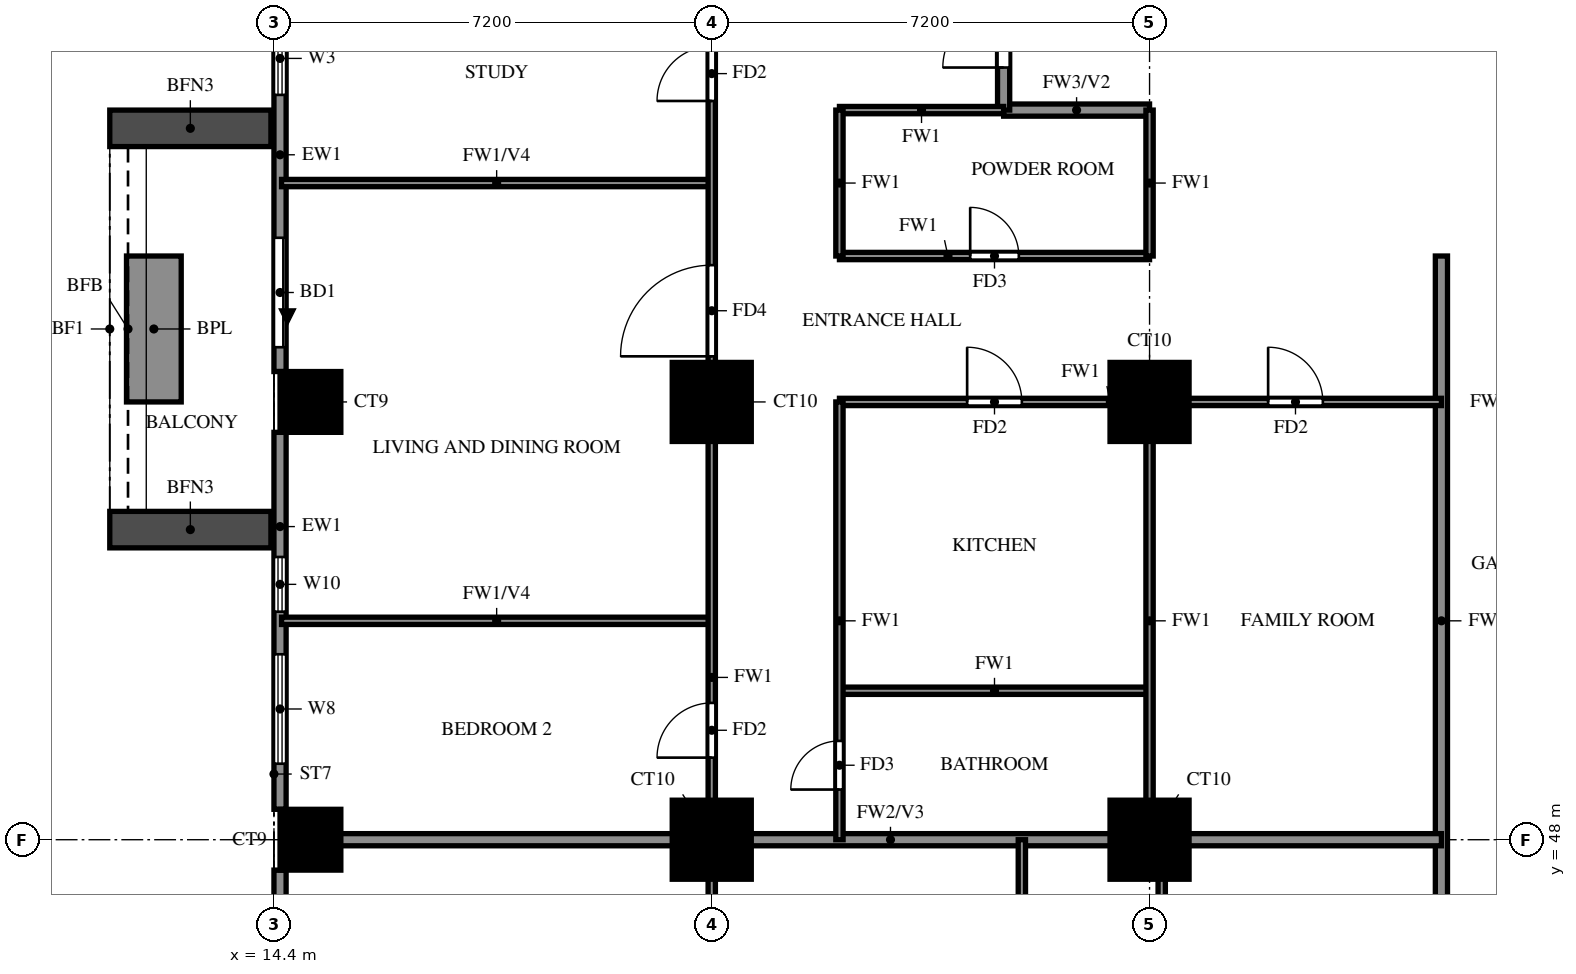
"""IFC4 building model, lengths in metres.
Left out: names, types, materials, properties, quantities, classifications, styles, units other than length and angle.
Written with IfcOpenShell. Run it as: python <this file> out.ifc"""

import sys

from ifc_helpers import new_model, si_unit, direction, frame, frame_2d, origin, origin_2d, place, context, subcontext, project, spatial, rectangle, extrude, source, transform, mapped, element, fill, save


model = new_model("IFC4")
c1 = context("Model", 3, precision=1e-05, world=origin(), true_north=direction((0.0, 1.0)))
c2 = subcontext(c1, "Body", "Model", "MODEL_VIEW")
j1 = project(units=[si_unit("LENGTHUNIT", "METRE"), si_unit("PLANEANGLEUNIT", "RADIAN")], contexts=[c1])
p1 = place(None, origin())
s1 = spatial("IfcSite", under=j1, at=p1, CompositionType="ELEMENT")
p2 = place(p1, origin())
s2 = spatial("IfcBuilding", under=s1, at=p2, CompositionType="ELEMENT")
p3 = place(p2, frame((0.0, 0.0, 86.5)))
s3 = spatial("IfcBuildingStorey", under=s2, at=p3, CompositionType="ELEMENT", Elevation=86.5)
m1 = source(origin(), c2, "Body", "SweptSolid", [
    extrude(rectangle(XDim=1.0, YDim=1.0, at=origin_2d()), origin(), (0.0, 0.0, 1.0), 3.18),
])
p4 = place(p3, frame((15.0, 48.0, 0.0), z_axis=(0.0, 0.0, 1.0), x_axis=(1.0, 0.0, 0.0)))
e1 = element("IfcColumn", 1, at=p4, inside=s3, PredefinedType="COLUMN", context=c2, shape_type="MappedRepresentation", body=[
    mapped(m1, transform((0.0, 0.0, 0.0))),
])
m2 = source(origin(), c2, "Body", "SweptSolid", [
    extrude(rectangle(XDim=1.3, YDim=1.3, at=origin_2d()), origin(), (0.0, 0.0, 1.0), 3.18),
])
for number, where, z_axis, x_axis in (
    (2, (21.6, 48.0, 0.0), (0.0, 0.0, 1.0), (1.0, 0.0, 0.0)),
    (3, (28.8, 48.0, 0.0), (0.0, 0.0, 1.0), (1.0, 0.0, 0.0)),
):
    element("IfcColumn", number, at=place(p3, frame(where, z_axis=z_axis, x_axis=x_axis)), inside=s3, PredefinedType="COLUMN", context=c2, shape_type="MappedRepresentation", body=[
        mapped(m2, transform((0.0, 0.0, 0.0))),
    ])
p5 = place(p3, frame((15.0, 55.2, 0.0), z_axis=(0.0, 0.0, 1.0), x_axis=(1.0, 0.0, 0.0)))
e4 = element("IfcColumn", 4, at=p5, inside=s3, PredefinedType="COLUMN", context=c2, shape_type="MappedRepresentation", body=[
    mapped(m1, transform((0.0, 0.0, 0.0))),
])
for number, where, z_axis, x_axis in (
    (5, (21.6, 55.2, 0.0), (0.0, 0.0, 1.0), (1.0, 0.0, 0.0)),
    (6, (28.8, 55.2, 0.0), (0.0, 0.0, 1.0), (1.0, 0.0, 0.0)),
):
    element("IfcColumn", number, at=place(p3, frame(where, z_axis=z_axis, x_axis=x_axis)), inside=s3, PredefinedType="COLUMN", context=c2, shape_type="MappedRepresentation", body=[
        mapped(m2, transform((0.0, 0.0, 0.0))),
    ])
p6 = place(p3, frame((14.5, 61.9, 0.0), z_axis=(0.0, 0.0, 1.0), x_axis=(0.0, -1.0, 0.0)))
e7 = element("IfcWall", 7, at=p6, inside=s3, PredefinedType="SOLIDWALL", context=c2, shape_type="SweptSolid", body=[
    extrude(rectangle(XDim=6.2, YDim=0.2, at=frame_2d((3.1, 0.0))), origin(), (0.0, 0.0, 1.0), 3.18),
])
p7 = place(p6, frame((4.0, 0.0, 0.0)))
e8 = element("IfcOpeningElement", 8, at=p7, cuts=e7, PredefinedType="OPENING", context=c2, shape_type="SweptSolid", body=[
    extrude(rectangle(XDim=1.8, YDim=2.4, at=frame_2d((0.9, 1.2))), frame((0.0, 0.11, 0.0), z_axis=(0.0, -1.0, 0.0), x_axis=(1.0, 0.0, 0.0)), (0.0, 0.0, 1.0), 0.22),
])
p8 = place(p6, frame((0.45, 0.0, 0.6)))
e9 = element("IfcOpeningElement", 9, at=p8, cuts=e7, PredefinedType="OPENING", context=c2, shape_type="SweptSolid", body=[
    extrude(rectangle(XDim=1.2, YDim=2.4, at=frame_2d((0.6, 1.2))), frame((0.0, 0.11, 0.0), z_axis=(0.0, -1.0, 0.0), x_axis=(1.0, 0.0, 0.0)), (0.0, 0.0, 1.0), 0.22),
])
p9 = place(p3, frame((14.5, 54.7, 0.0), z_axis=(0.0, 0.0, 1.0), x_axis=(0.0, -1.0, 0.0)))
e10 = element("IfcWall", 10, at=p9, inside=s3, PredefinedType="SOLIDWALL", context=c2, shape_type="SweptSolid", body=[
    extrude(rectangle(XDim=6.2, YDim=0.2, at=frame_2d((3.1, 0.0))), origin(), (0.0, 0.0, 1.0), 3.18),
])
p10 = place(p9, frame((3.65, 0.0, 0.6)))
e11 = element("IfcOpeningElement", 11, at=p10, cuts=e10, PredefinedType="OPENING", context=c2, shape_type="SweptSolid", body=[
    extrude(rectangle(XDim=1.8, YDim=2.4, at=frame_2d((0.9, 1.2))), frame((0.0, 0.11, 0.0), z_axis=(0.0, -1.0, 0.0), x_axis=(1.0, 0.0, 0.0)), (0.0, 0.0, 1.0), 0.22),
])
p11 = place(p9, frame((2.05, 0.0, 0.6)))
e12 = element("IfcOpeningElement", 12, at=p11, cuts=e10, PredefinedType="OPENING", context=c2, shape_type="SweptSolid", body=[
    extrude(rectangle(XDim=0.9, YDim=2.4, at=frame_2d((0.45, 1.2))), frame((0.0, 0.11, 0.0), z_axis=(0.0, -1.0, 0.0), x_axis=(1.0, 0.0, 0.0)), (0.0, 0.0, 1.0), 0.22),
])
p12 = place(p3, frame((14.5, 47.5, 0.0), z_axis=(0.0, 0.0, 1.0), x_axis=(0.0, -1.0, 0.0)))
e13 = element("IfcWall", 13, at=p12, inside=s3, PredefinedType="SOLIDWALL", context=c2, shape_type="SweptSolid", body=[
    extrude(rectangle(XDim=6.2, YDim=0.2, at=frame_2d((3.1, 0.0))), origin(), (0.0, 0.0, 1.0), 3.18),
])
p13 = place(p12, frame((4.0, 0.0, 0.0)))
e14 = element("IfcOpeningElement", 14, at=p13, cuts=e13, PredefinedType="OPENING", context=c2, shape_type="SweptSolid", body=[
    extrude(rectangle(XDim=1.8, YDim=2.4, at=frame_2d((0.9, 1.2))), frame((0.0, 0.11, 0.0), z_axis=(0.0, -1.0, 0.0), x_axis=(1.0, 0.0, 0.0)), (0.0, 0.0, 1.0), 0.22),
])
p14 = place(p12, frame((0.45, 0.0, 0.6)))
e15 = element("IfcOpeningElement", 15, at=p14, cuts=e13, PredefinedType="OPENING", context=c2, shape_type="SweptSolid", body=[
    extrude(rectangle(XDim=1.2, YDim=2.4, at=frame_2d((0.6, 1.2))), frame((0.0, 0.11, 0.0), z_axis=(0.0, -1.0, 0.0), x_axis=(1.0, 0.0, 0.0)), (0.0, 0.0, 1.0), 0.22),
])
p15 = place(p12, frame((2.65, 0.0, 0.6)))
e16 = element("IfcOpeningElement", 16, at=p15, cuts=e13, PredefinedType="OPENING", context=c2, shape_type="SweptSolid", body=[
    extrude(rectangle(XDim=0.9, YDim=2.4, at=frame_2d((0.45, 1.2))), frame((0.0, 0.11, 0.0), z_axis=(0.0, -1.0, 0.0), x_axis=(1.0, 0.0, 0.0)), (0.0, 0.0, 1.0), 0.22),
])
for number, where, z_axis, x_axis in (
    (17, (14.35, 59.7, 0.0), (0.0, 0.0, 1.0), (-1.0, 0.0, 0.0)),
    (18, (14.35, 53.1, 0.0), (0.0, 0.0, 1.0), (-1.0, 0.0, 0.0)),
):
    element("IfcWall", number, at=place(p3, frame(where, z_axis=z_axis, x_axis=x_axis)), inside=s3, PredefinedType="SOLIDWALL", context=c2, shape_type="SweptSolid", body=[
        extrude(rectangle(XDim=2.65, YDim=0.6, at=frame_2d((1.325, 0.0))), origin(), (0.0, 0.0, 1.0), 2.85),
    ])
p16 = place(p3, frame((12.425, 57.6, 0.0), z_axis=(0.0, 0.0, 1.0), x_axis=(0.0, -1.0, 0.0)))
e19 = element("IfcWall", 19, at=p16, inside=s3, PredefinedType="SOLIDWALL", context=c2, shape_type="SweptSolid", body=[
    extrude(rectangle(XDim=2.4, YDim=0.9, at=frame_2d((1.2, 0.0))), origin(), (0.0, 0.0, 1.0), 0.9),
])
p17 = place(p3, frame((26.4, 60.0, 0.0), z_axis=(0.0, 0.0, 1.0), x_axis=(1.0, 0.0, 0.0)))
e20 = element("IfcWall", 20, at=p17, inside=s3, PredefinedType="SOLIDWALL", context=c2, shape_type="SweptSolid", body=[
    extrude(rectangle(XDim=2.4, YDim=0.2, at=frame_2d((1.2, 0.0))), origin(), (0.0, 0.0, 1.0), 3.18),
])
p18 = place(p3, frame((26.4, 60.0, 0.0), z_axis=(0.0, 0.0, 1.0), x_axis=(0.0, 1.0, 0.0)))
e21 = element("IfcWall", 21, at=p18, inside=s3, PredefinedType="SOLIDWALL", context=c2, shape_type="SweptSolid", body=[
    extrude(rectangle(XDim=9.45, YDim=0.2, at=frame_2d((4.725, 0.0))), origin(), (0.0, 0.0, 1.0), 3.18),
])
p19 = place(p18, frame((0.7, 0.0, 0.0)))
e22 = element("IfcOpeningElement", 22, at=p19, cuts=e21, PredefinedType="OPENING", context=c2, shape_type="SweptSolid", body=[
    extrude(rectangle(XDim=1.0, YDim=2.1, at=frame_2d((0.5, 1.05))), frame((0.0, 0.11, 0.0), z_axis=(0.0, -1.0, 0.0), x_axis=(1.0, 0.0, 0.0)), (0.0, 0.0, 1.0), 0.22),
])
p20 = place(p18, frame((3.1, 0.0, 0.0)))
e23 = element("IfcOpeningElement", 23, at=p20, cuts=e21, PredefinedType="OPENING", context=c2, shape_type="SweptSolid", body=[
    extrude(rectangle(XDim=1.0, YDim=2.1, at=frame_2d((0.5, 1.05))), frame((0.0, 0.11, 0.0), z_axis=(0.0, -1.0, 0.0), x_axis=(1.0, 0.0, 0.0)), (0.0, 0.0, 1.0), 0.22),
])
p21 = place(p3, frame((33.6, 45.6, 0.0), z_axis=(0.0, 0.0, 1.0), x_axis=(0.0, 1.0, 0.0)))
e24 = element("IfcWall", 24, at=p21, inside=s3, PredefinedType="SOLIDWALL", context=c2, shape_type="SweptSolid", body=[
    extrude(rectangle(XDim=12.0, YDim=0.2, at=frame_2d((6.0, 0.0))), origin(), (0.0, 0.0, 1.0), 3.18),
])
p22 = place(p3, frame((14.525, 48.0, 0.0), z_axis=(0.0, 0.0, 1.0), x_axis=(1.0, 0.0, 0.0)))
e25 = element("IfcWall", 25, at=p22, inside=s3, PredefinedType="SOLIDWALL", context=c2, shape_type="SweptSolid", body=[
    extrude(rectangle(XDim=19.075, YDim=0.2, at=frame_2d((9.538, 0.0))), origin(), (0.0, 0.0, 1.0), 3.18),
])
p23 = place(p3, frame((23.7, 50.45, 0.0), z_axis=(0.0, 0.0, 1.0), x_axis=(1.0, 0.0, 0.0)))
e26 = element("IfcWall", 26, at=p23, inside=s3, PredefinedType="PARTITIONING", context=c2, shape_type="SweptSolid", body=[
    extrude(rectangle(XDim=5.1, YDim=0.12, at=frame_2d((2.55, 0.0))), origin(), (0.0, 0.0, 1.0), 3.18),
])
p24 = place(p3, frame((14.525, 51.6, 0.0), z_axis=(0.0, 0.0, 1.0), x_axis=(1.0, 0.0, 0.0)))
e27 = element("IfcWall", 27, at=p24, inside=s3, PredefinedType="PARTITIONING", context=c2, shape_type="SweptSolid", body=[
    extrude(rectangle(XDim=7.075, YDim=0.12, at=frame_2d((3.538, 0.0))), origin(), (0.0, 0.0, 1.0), 2.28),
])
p25 = place(p3, frame((23.7, 55.2, 0.0), z_axis=(0.0, 0.0, 1.0), x_axis=(1.0, 0.0, 0.0)))
e28 = element("IfcWall", 28, at=p25, inside=s3, PredefinedType="PARTITIONING", context=c2, shape_type="SweptSolid", body=[
    extrude(rectangle(XDim=9.9, YDim=0.12, at=frame_2d((4.95, 0.0))), origin(), (0.0, 0.0, 1.0), 3.18),
])
p26 = place(p25, frame((2.1, 0.0, 0.0)))
e29 = element("IfcOpeningElement", 29, at=p26, cuts=e28, PredefinedType="OPENING", context=c2, shape_type="SweptSolid", body=[
    extrude(rectangle(XDim=0.9, YDim=2.1, at=frame_2d((0.45, 1.05))), frame((0.0, 0.07, 0.0), z_axis=(0.0, -1.0, 0.0), x_axis=(1.0, 0.0, 0.0)), (0.0, 0.0, 1.0), 0.14),
])
p27 = place(p25, frame((7.05, 0.0, 0.0)))
e30 = element("IfcOpeningElement", 30, at=p27, cuts=e28, PredefinedType="OPENING", context=c2, shape_type="SweptSolid", body=[
    extrude(rectangle(XDim=0.9, YDim=2.1, at=frame_2d((0.45, 1.05))), frame((0.0, 0.07, 0.0), z_axis=(0.0, -1.0, 0.0), x_axis=(1.0, 0.0, 0.0)), (0.0, 0.0, 1.0), 0.14),
])
p28 = place(p3, frame((23.7, 57.6, 0.0), z_axis=(0.0, 0.0, 1.0), x_axis=(1.0, 0.0, 0.0)))
e31 = element("IfcWall", 31, at=p28, inside=s3, PredefinedType="PARTITIONING", context=c2, shape_type="SweptSolid", body=[
    extrude(rectangle(XDim=5.1, YDim=0.12, at=frame_2d((2.55, 0.0))), origin(), (0.0, 0.0, 1.0), 3.18),
])
p29 = place(p28, frame((2.15, 0.0, 0.0)))
e32 = element("IfcOpeningElement", 32, at=p29, cuts=e31, PredefinedType="OPENING", context=c2, shape_type="SweptSolid", body=[
    extrude(rectangle(XDim=0.8, YDim=2.1, at=frame_2d((0.4, 1.05))), frame((0.0, 0.07, 0.0), z_axis=(0.0, -1.0, 0.0), x_axis=(1.0, 0.0, 0.0)), (0.0, 0.0, 1.0), 0.14),
])
p30 = place(p3, frame((14.525, 58.8, 0.0), z_axis=(0.0, 0.0, 1.0), x_axis=(1.0, 0.0, 0.0)))
e33 = element("IfcWall", 33, at=p30, inside=s3, PredefinedType="PARTITIONING", context=c2, shape_type="SweptSolid", body=[
    extrude(rectangle(XDim=7.075, YDim=0.12, at=frame_2d((3.538, 0.0))), origin(), (0.0, 0.0, 1.0), 2.28),
])
p31 = place(p3, frame((23.7, 60.0, 0.0), z_axis=(0.0, 0.0, 1.0), x_axis=(1.0, 0.0, 0.0)))
e34 = element("IfcWall", 34, at=p31, inside=s3, PredefinedType="PARTITIONING", context=c2, shape_type="SweptSolid", body=[
    extrude(rectangle(XDim=2.7, YDim=0.12, at=frame_2d((1.35, 0.0))), origin(), (0.0, 0.0, 1.0), 3.18),
])
p32 = place(p3, frame((21.6, 33.725, 0.0), z_axis=(0.0, 0.0, 1.0), x_axis=(0.0, 1.0, 0.0)))
e35 = element("IfcWall", 35, at=p32, inside=s3, PredefinedType="PARTITIONING", context=c2, shape_type="SweptSolid", body=[
    extrude(rectangle(XDim=32.275, YDim=0.12, at=frame_2d((16.137, 0.0))), origin(), (0.0, 0.0, 1.0), 3.18),
])
p33 = place(p32, frame((7.775, 0.0, 0.0)))
e36 = element("IfcOpeningElement", 36, at=p33, cuts=e35, PredefinedType="OPENING", context=c2, shape_type="SweptSolid", body=[
    extrude(rectangle(XDim=0.9, YDim=2.1, at=frame_2d((0.45, 1.05))), frame((0.0, 0.07, 0.0), z_axis=(0.0, -1.0, 0.0), x_axis=(1.0, 0.0, 0.0)), (0.0, 0.0, 1.0), 0.14),
])
p34 = place(p32, frame((15.625, 0.0, 0.0)))
e37 = element("IfcOpeningElement", 37, at=p34, cuts=e35, PredefinedType="OPENING", context=c2, shape_type="SweptSolid", body=[
    extrude(rectangle(XDim=0.9, YDim=2.1, at=frame_2d((0.45, 1.05))), frame((0.0, 0.07, 0.0), z_axis=(0.0, -1.0, 0.0), x_axis=(1.0, 0.0, 0.0)), (0.0, 0.0, 1.0), 0.14),
])
p35 = place(p32, frame((22.225, 0.0, 0.0)))
e38 = element("IfcOpeningElement", 38, at=p35, cuts=e35, PredefinedType="OPENING", context=c2, shape_type="SweptSolid", body=[
    extrude(rectangle(XDim=1.5, YDim=2.1, at=frame_2d((0.75, 1.05))), frame((0.0, 0.07, 0.0), z_axis=(0.0, -1.0, 0.0), x_axis=(1.0, 0.0, 0.0)), (0.0, 0.0, 1.0), 0.14),
])
p36 = place(p32, frame((26.425, 0.0, 0.0)))
e39 = element("IfcOpeningElement", 39, at=p36, cuts=e35, PredefinedType="OPENING", context=c2, shape_type="SweptSolid", body=[
    extrude(rectangle(XDim=0.9, YDim=2.1, at=frame_2d((0.45, 1.05))), frame((0.0, 0.07, 0.0), z_axis=(0.0, -1.0, 0.0), x_axis=(1.0, 0.0, 0.0)), (0.0, 0.0, 1.0), 0.14),
])
p37 = place(p32, frame((30.025, 0.0, 0.0)))
e40 = element("IfcOpeningElement", 40, at=p37, cuts=e35, PredefinedType="OPENING", context=c2, shape_type="SweptSolid", body=[
    extrude(rectangle(XDim=0.9, YDim=2.1, at=frame_2d((0.45, 1.05))), frame((0.0, 0.07, 0.0), z_axis=(0.0, -1.0, 0.0), x_axis=(1.0, 0.0, 0.0)), (0.0, 0.0, 1.0), 0.14),
])
p38 = place(p3, frame((23.7, 48.0, 0.0), z_axis=(0.0, 0.0, 1.0), x_axis=(0.0, 1.0, 0.0)))
e41 = element("IfcWall", 41, at=p38, inside=s3, PredefinedType="PARTITIONING", context=c2, shape_type="SweptSolid", body=[
    extrude(rectangle(XDim=7.2, YDim=0.12, at=frame_2d((3.6, 0.0))), origin(), (0.0, 0.0, 1.0), 3.18),
])
p39 = place(p38, frame((0.825, 0.0, 0.0)))
e42 = element("IfcOpeningElement", 42, at=p39, cuts=e41, PredefinedType="OPENING", context=c2, shape_type="SweptSolid", body=[
    extrude(rectangle(XDim=0.8, YDim=2.1, at=frame_2d((0.4, 1.05))), frame((0.0, 0.07, 0.0), z_axis=(0.0, -1.0, 0.0), x_axis=(1.0, 0.0, 0.0)), (0.0, 0.0, 1.0), 0.14),
])
p40 = place(p3, frame((23.7, 57.6, 0.0), z_axis=(0.0, 0.0, 1.0), x_axis=(0.0, 1.0, 0.0)))
e43 = element("IfcWall", 43, at=p40, inside=s3, PredefinedType="PARTITIONING", context=c2, shape_type="SweptSolid", body=[
    extrude(rectangle(XDim=2.4, YDim=0.12, at=frame_2d((1.2, 0.0))), origin(), (0.0, 0.0, 1.0), 3.18),
])
p41 = place(p3, frame((26.7, 42.9, 0.0), z_axis=(0.0, 0.0, 1.0), x_axis=(0.0, 1.0, 0.0)))
e44 = element("IfcWall", 44, at=p41, inside=s3, PredefinedType="PARTITIONING", context=c2, shape_type="SweptSolid", body=[
    extrude(rectangle(XDim=5.1, YDim=0.12, at=frame_2d((2.55, 0.0))), origin(), (0.0, 0.0, 1.0), 3.18),
])
p42 = place(p3, frame((28.8, 48.0, 0.0), z_axis=(0.0, 0.0, 1.0), x_axis=(0.0, 1.0, 0.0)))
e45 = element("IfcWall", 45, at=p42, inside=s3, PredefinedType="PARTITIONING", context=c2, shape_type="SweptSolid", body=[
    extrude(rectangle(XDim=7.2, YDim=0.12, at=frame_2d((3.6, 0.0))), origin(), (0.0, 0.0, 1.0), 3.18),
])
p43 = place(p3, frame((28.8, 57.6, 0.0), z_axis=(0.0, 0.0, 1.0), x_axis=(0.0, 1.0, 0.0)))
e46 = element("IfcWall", 46, at=p43, inside=s3, PredefinedType="PARTITIONING", context=c2, shape_type="SweptSolid", body=[
    extrude(rectangle(XDim=2.4, YDim=0.12, at=frame_2d((1.2, 0.0))), origin(), (0.0, 0.0, 1.0), 3.18),
])
p44 = place(p3, frame((29.0, 42.9, 0.0), z_axis=(0.0, 0.0, 1.0), x_axis=(0.0, 1.0, 0.0)))
e47 = element("IfcWall", 47, at=p44, inside=s3, PredefinedType="PARTITIONING", context=c2, shape_type="SweptSolid", body=[
    extrude(rectangle(XDim=5.1, YDim=0.12, at=frame_2d((2.55, 0.0))), origin(), (0.0, 0.0, 1.0), 3.18),
])
p45 = place(p7, origin())
e48 = element("IfcDoor", 48, at=p45, inside=s3, OperationType="DOUBLE_DOOR_SLIDING", PredefinedType="DOOR", context=c2, shape_type="SweptSolid", body=[
    extrude(rectangle(XDim=1.8, YDim=2.4, at=frame_2d((0.9, 1.2))), frame((0.0, 0.025, 0.0), z_axis=(0.0, -1.0, 0.0), x_axis=(1.0, 0.0, 0.0)), (0.0, 0.0, 1.0), 0.05),
])
fill(e8, e48)
p46 = place(p8, origin())
e49 = element("IfcWindow", 49, at=p46, inside=s3, PartitioningType="SINGLE_PANEL", PredefinedType="WINDOW", context=c2, shape_type="SweptSolid", body=[
    extrude(rectangle(XDim=1.2, YDim=2.4, at=frame_2d((0.6, 1.2))), frame((0.0, 0.03, 0.0), z_axis=(0.0, -1.0, 0.0), x_axis=(1.0, 0.0, 0.0)), (0.0, 0.0, 1.0), 0.06),
])
fill(e9, e49)
p47 = place(p10, origin())
e50 = element("IfcWindow", 50, at=p47, inside=s3, PartitioningType="DOUBLE_PANEL_VERTICAL", PredefinedType="WINDOW", context=c2, shape_type="SweptSolid", body=[
    extrude(rectangle(XDim=1.8, YDim=2.4, at=frame_2d((0.9, 1.2))), frame((0.0, 0.03, 0.0), z_axis=(0.0, -1.0, 0.0), x_axis=(1.0, 0.0, 0.0)), (0.0, 0.0, 1.0), 0.06),
])
fill(e11, e50)
p48 = place(p11, origin())
e51 = element("IfcWindow", 51, at=p48, inside=s3, PartitioningType="SINGLE_PANEL", PredefinedType="WINDOW", context=c2, shape_type="SweptSolid", body=[
    extrude(rectangle(XDim=0.9, YDim=2.4, at=frame_2d((0.45, 1.2))), frame((0.0, 0.03, 0.0), z_axis=(0.0, -1.0, 0.0), x_axis=(1.0, 0.0, 0.0)), (0.0, 0.0, 1.0), 0.06),
])
fill(e12, e51)
p49 = place(p19, origin())
e52 = element("IfcDoor", 52, at=p49, inside=s3, OperationType="SINGLE_SWING_LEFT", PredefinedType="DOOR", context=c2, shape_type="SweptSolid", body=[
    extrude(rectangle(XDim=1.0, YDim=2.1, at=frame_2d((0.5, 1.05))), frame((0.0, 0.025, 0.0), z_axis=(0.0, -1.0, 0.0), x_axis=(1.0, 0.0, 0.0)), (0.0, 0.0, 1.0), 0.05),
])
fill(e22, e52)
p50 = place(p34, origin())
e53 = element("IfcDoor", 53, at=p50, inside=s3, OperationType="SINGLE_SWING_LEFT", PredefinedType="DOOR", context=c2, shape_type="SweptSolid", body=[
    extrude(rectangle(XDim=0.9, YDim=2.1, at=frame_2d((0.45, 1.05))), frame((0.0, 0.025, 0.0), z_axis=(0.0, -1.0, 0.0), x_axis=(1.0, 0.0, 0.0)), (0.0, 0.0, 1.0), 0.05),
])
fill(e37, e53)
p51 = place(p35, origin())
e54 = element("IfcDoor", 54, at=p51, inside=s3, OperationType="SINGLE_SWING_LEFT", PredefinedType="DOOR", context=c2, shape_type="SweptSolid", body=[
    extrude(rectangle(XDim=1.5, YDim=2.1, at=frame_2d((0.75, 1.05))), frame((0.0, 0.025, 0.0), z_axis=(0.0, -1.0, 0.0), x_axis=(1.0, 0.0, 0.0)), (0.0, 0.0, 1.0), 0.05),
])
fill(e38, e54)
p52 = place(p36, origin())
e55 = element("IfcDoor", 55, at=p52, inside=s3, OperationType="SINGLE_SWING_LEFT", PredefinedType="DOOR", context=c2, shape_type="SweptSolid", body=[
    extrude(rectangle(XDim=0.9, YDim=2.1, at=frame_2d((0.45, 1.05))), frame((0.0, 0.025, 0.0), z_axis=(0.0, -1.0, 0.0), x_axis=(1.0, 0.0, 0.0)), (0.0, 0.0, 1.0), 0.05),
])
fill(e39, e55)
p53 = place(p39, origin())
e56 = element("IfcDoor", 56, at=p53, inside=s3, OperationType="SINGLE_SWING_LEFT", PredefinedType="DOOR", context=c2, shape_type="SweptSolid", body=[
    extrude(rectangle(XDim=0.8, YDim=2.1, at=frame_2d((0.4, 1.05))), frame((0.0, 0.025, 0.0), z_axis=(0.0, -1.0, 0.0), x_axis=(1.0, 0.0, 0.0)), (0.0, 0.0, 1.0), 0.05),
])
fill(e42, e56)
p54 = place(p26, origin())
e57 = element("IfcDoor", 57, at=p54, inside=s3, OperationType="SINGLE_SWING_RIGHT", PredefinedType="DOOR", context=c2, shape_type="SweptSolid", body=[
    extrude(rectangle(XDim=0.9, YDim=2.1, at=frame_2d((0.45, 1.05))), frame((0.0, 0.025, 0.0), z_axis=(0.0, -1.0, 0.0), x_axis=(1.0, 0.0, 0.0)), (0.0, 0.0, 1.0), 0.05),
])
fill(e29, e57)
p55 = place(p29, origin())
e58 = element("IfcDoor", 58, at=p55, inside=s3, OperationType="SINGLE_SWING_LEFT", PredefinedType="DOOR", context=c2, shape_type="SweptSolid", body=[
    extrude(rectangle(XDim=0.8, YDim=2.1, at=frame_2d((0.4, 1.05))), frame((0.0, 0.025, 0.0), z_axis=(0.0, -1.0, 0.0), x_axis=(1.0, 0.0, 0.0)), (0.0, 0.0, 1.0), 0.05),
])
fill(e32, e58)
p56 = place(p27, origin())
e59 = element("IfcDoor", 59, at=p56, inside=s3, OperationType="SINGLE_SWING_LEFT", PredefinedType="DOOR", context=c2, shape_type="SweptSolid", body=[
    extrude(rectangle(XDim=0.9, YDim=2.1, at=frame_2d((0.45, 1.05))), frame((0.0, 0.025, 0.0), z_axis=(0.0, -1.0, 0.0), x_axis=(1.0, 0.0, 0.0)), (0.0, 0.0, 1.0), 0.05),
])
fill(e30, e59)
save(model, sys.argv[1])
